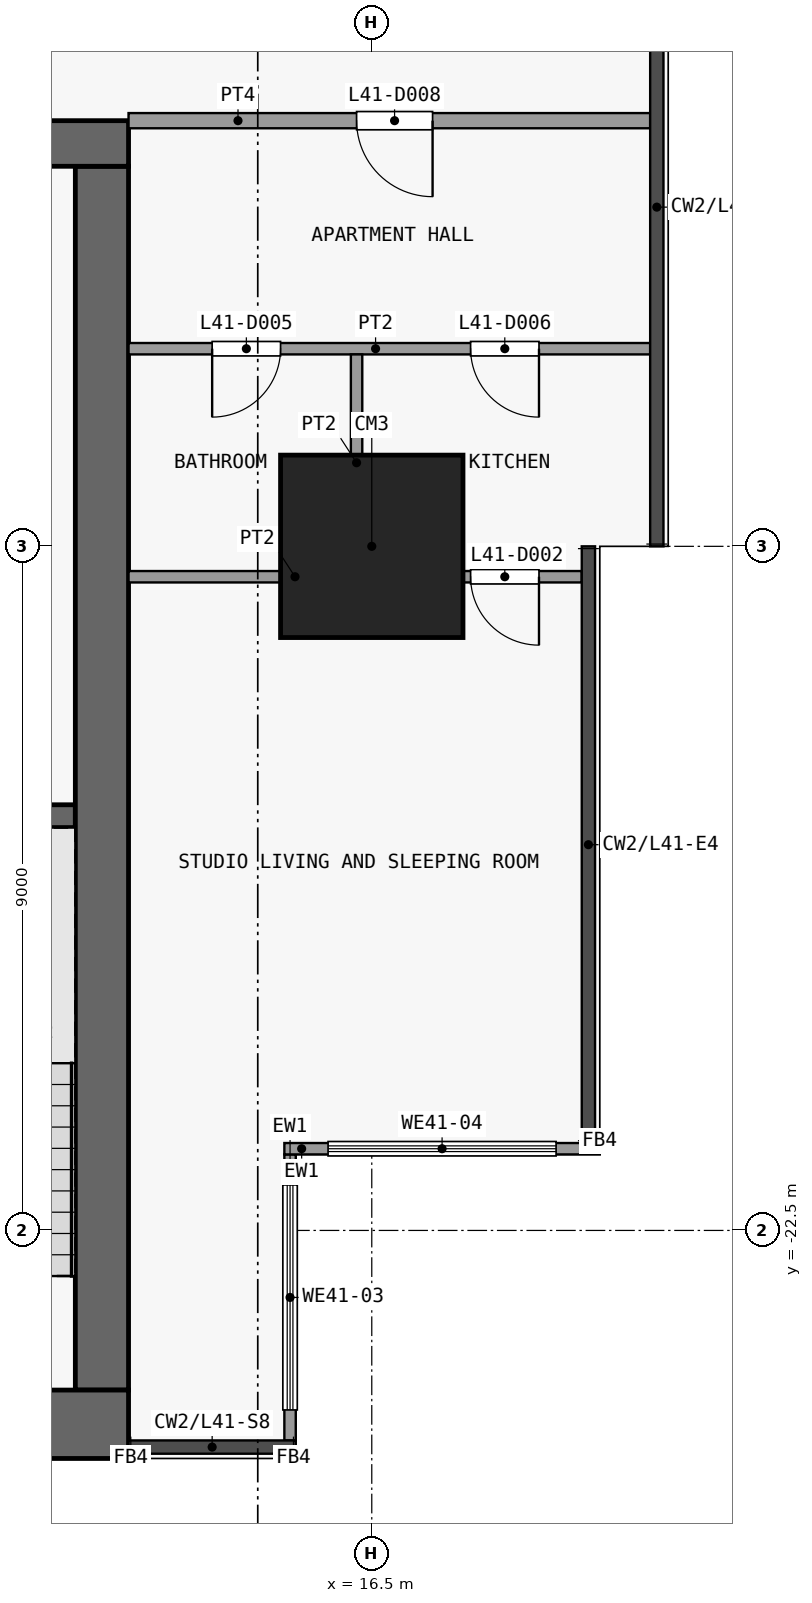
"""IFC4 building model, lengths in metres.
Left out: names, types, materials, properties, quantities, classifications, styles, units other than length and angle.
Written with IfcOpenShell. Run it as: python <this file> out.ifc"""

import sys

from ifc_helpers import new_model, si_unit, direction, frame, frame_2d, origin, origin_2d, place, context, subcontext, project, spatial, rectangle, extrude, element, fill, save


model = new_model("IFC4")
c1 = context("Model", 3, precision=1e-05, world=origin(), true_north=direction((0.0, 1.0)))
c2 = subcontext(c1, "Body", "Model", "MODEL_VIEW")
j1 = project(units=[si_unit("LENGTHUNIT", "METRE"), si_unit("PLANEANGLEUNIT", "RADIAN")], contexts=[c1])
p1 = place(None, origin())
s1 = spatial("IfcSite", under=j1, at=p1, CompositionType="ELEMENT")
p2 = place(p1, origin())
s2 = spatial("IfcBuilding", under=s1, at=p2, CompositionType="ELEMENT")
p3 = place(p2, frame((0.0, 0.0, 167.3)))
s3 = spatial("IfcBuildingStorey", under=s2, at=p3, CompositionType="ELEMENT", Elevation=167.3)
p4 = place(p3, frame((16.5, -13.5, 0.0), z_axis=(0.0, 0.0, 1.0), x_axis=(1.0, 0.0, 0.0)))
e1 = element("IfcColumn", 1, at=p4, inside=s3, PredefinedType="COLUMN", context=c2, shape_type="SweptSolid", body=[
    extrude(rectangle(XDim=2.4, YDim=2.4, at=origin_2d()), origin(), (0.0, 0.0, 1.0), 3.6),
])
p5 = place(p3, frame((-13.3, -25.05, 0.0), z_axis=(0.0, 0.0, 1.0), x_axis=(1.0, 0.0, 0.0)))
e2 = element("IfcWall", 2, at=p5, inside=s3, PredefinedType="SHEAR", context=c2, shape_type="SweptSolid", body=[
    extrude(rectangle(XDim=26.6, YDim=0.9, at=frame_2d((13.3, 0.0))), origin(), (0.0, 0.0, 1.0), 3.3),
])
p6 = place(p3, frame((-13.3, -8.2, 0.0), z_axis=(0.0, 0.0, 1.0), x_axis=(1.0, 0.0, 0.0)))
e3 = element("IfcWall", 3, at=p6, inside=s3, PredefinedType="SHEAR", context=c2, shape_type="SweptSolid", body=[
    extrude(rectangle(XDim=26.6, YDim=0.6, at=frame_2d((13.3, 0.0))), origin(), (0.0, 0.0, 1.0), 3.3),
])
p7 = place(p6, frame((7.6, 0.0, 0.0)))
e4 = element("IfcOpeningElement", 4, at=p7, cuts=e3, PredefinedType="OPENING", context=c2, shape_type="SweptSolid", body=[
    extrude(rectangle(XDim=1.8, YDim=2.1, at=frame_2d((0.9, 1.05))), frame((0.0, 0.31, 0.0), z_axis=(0.0, -1.0, 0.0), x_axis=(1.0, 0.0, 0.0)), (0.0, 0.0, 1.0), 0.62),
])
p8 = place(p6, frame((17.2, 0.0, 0.0)))
e5 = element("IfcOpeningElement", 5, at=p8, cuts=e3, PredefinedType="OPENING", context=c2, shape_type="SweptSolid", body=[
    extrude(rectangle(XDim=1.8, YDim=2.1, at=frame_2d((0.9, 1.05))), frame((0.0, 0.31, 0.0), z_axis=(0.0, -1.0, 0.0), x_axis=(1.0, 0.0, 0.0)), (0.0, 0.0, 1.0), 0.62),
])
p9 = place(p6, frame((2.525, 0.0, 0.0)))
e6 = element("IfcOpeningElement", 6, at=p9, cuts=e3, PredefinedType="OPENING", context=c2, shape_type="SweptSolid", body=[
    extrude(rectangle(XDim=0.9, YDim=2.1, at=frame_2d((0.45, 1.05))), frame((0.0, 0.31, 0.0), z_axis=(0.0, -1.0, 0.0), x_axis=(1.0, 0.0, 0.0)), (0.0, 0.0, 1.0), 0.62),
])
p10 = place(p6, frame((23.875, 0.0, 0.0)))
e7 = element("IfcOpeningElement", 7, at=p10, cuts=e3, PredefinedType="OPENING", context=c2, shape_type="SweptSolid", body=[
    extrude(rectangle(XDim=1.2, YDim=2.1, at=frame_2d((0.6, 1.05))), frame((0.0, 0.31, 0.0), z_axis=(0.0, -1.0, 0.0), x_axis=(1.0, 0.0, 0.0)), (0.0, 0.0, 1.0), 0.62),
])
p11 = place(p3, frame((12.95, -24.6, 0.0), z_axis=(0.0, 0.0, 1.0), x_axis=(0.0, 1.0, 0.0)))
e8 = element("IfcWall", 8, at=p11, inside=s3, PredefinedType="SHEAR", context=c2, shape_type="SweptSolid", body=[
    extrude(rectangle(XDim=16.1, YDim=0.7, at=frame_2d((8.05, 0.0))), origin(), (0.0, 0.0, 1.0), 3.3),
])
p12 = place(p3, frame((9.5, -17.05, 0.0), z_axis=(0.0, 0.0, 1.0), x_axis=(1.0, 0.0, 0.0)))
e9 = element("IfcWall", 9, at=p12, inside=s3, PredefinedType="SHEAR", context=c2, shape_type="SweptSolid", body=[
    extrude(rectangle(XDim=3.1, YDim=0.3, at=frame_2d((1.55, 0.0))), origin(), (0.0, 0.0, 1.0), 3.3),
])
p13 = place(p3, frame((15.425, -21.5, 0.0), z_axis=(0.0, 0.0, 1.0), x_axis=(0.0, -1.0, 0.0)))
e10 = element("IfcWall", 10, at=p13, inside=s3, PredefinedType="SOLIDWALL", context=c2, shape_type="SweptSolid", body=[
    extrude(rectangle(XDim=3.762, YDim=0.15, at=frame_2d((1.881, 0.0))), origin(), (0.0, 0.0, 1.0), 3.3),
])
p14 = place(p13, frame((0.401, 0.0, 0.9)))
e11 = element("IfcOpeningElement", 11, at=p14, cuts=e10, PredefinedType="OPENING", context=c2, shape_type="SweptSolid", body=[
    extrude(rectangle(XDim=2.96, YDim=2.4, at=frame_2d((1.48, 1.2))), frame((0.0, 0.085, 0.0), z_axis=(0.0, -1.0, 0.0), x_axis=(1.0, 0.0, 0.0)), (0.0, 0.0, 1.0), 0.17),
])
p15 = place(p3, frame((19.5, -21.425, 0.0), z_axis=(0.0, 0.0, 1.0), x_axis=(-1.0, 0.0, 0.0)))
e12 = element("IfcWall", 12, at=p15, inside=s3, PredefinedType="SOLIDWALL", context=c2, shape_type="SweptSolid", body=[
    extrude(rectangle(XDim=4.15, YDim=0.15, at=frame_2d((2.075, 0.0))), origin(), (0.0, 0.0, 1.0), 3.3),
])
p16 = place(p15, frame((0.575, 0.0, 0.9)))
e13 = element("IfcOpeningElement", 13, at=p16, cuts=e12, PredefinedType="OPENING", context=c2, shape_type="SweptSolid", body=[
    extrude(rectangle(XDim=3.0, YDim=2.4, at=frame_2d((1.5, 1.2))), frame((0.0, 0.085, 0.0), z_axis=(0.0, -1.0, 0.0), x_axis=(1.0, 0.0, 0.0)), (0.0, 0.0, 1.0), 0.17),
])
p17 = place(p3, frame((13.3, -13.9, 0.0), z_axis=(0.0, 0.0, 1.0), x_axis=(1.0, 0.0, 0.0)))
e14 = element("IfcWall", 14, at=p17, inside=s3, PredefinedType="PARTITIONING", context=c2, shape_type="SweptSolid", body=[
    extrude(rectangle(XDim=5.962, YDim=0.15, at=frame_2d((2.981, 0.0))), origin(), (0.0, 0.0, 1.0), 3.3),
])
p18 = place(p17, frame((4.5, 0.0, 0.0)))
e15 = element("IfcOpeningElement", 15, at=p18, cuts=e14, PredefinedType="OPENING", context=c2, shape_type="SweptSolid", body=[
    extrude(rectangle(XDim=0.9, YDim=2.1, at=frame_2d((0.45, 1.05))), frame((0.0, 0.085, 0.0), z_axis=(0.0, -1.0, 0.0), x_axis=(1.0, 0.0, 0.0)), (0.0, 0.0, 1.0), 0.17),
])
p19 = place(p3, frame((13.3, -10.9, 0.0), z_axis=(0.0, 0.0, 1.0), x_axis=(1.0, 0.0, 0.0)))
e16 = element("IfcWall", 16, at=p19, inside=s3, PredefinedType="PARTITIONING", context=c2, shape_type="SweptSolid", body=[
    extrude(rectangle(XDim=6.863, YDim=0.15, at=frame_2d((3.431, 0.0))), origin(), (0.0, 0.0, 1.0), 3.3),
])
p20 = place(p19, frame((1.1, 0.0, 0.0)))
e17 = element("IfcOpeningElement", 17, at=p20, cuts=e16, PredefinedType="OPENING", context=c2, shape_type="SweptSolid", body=[
    extrude(rectangle(XDim=0.9, YDim=2.1, at=frame_2d((0.45, 1.05))), frame((0.0, 0.085, 0.0), z_axis=(0.0, -1.0, 0.0), x_axis=(1.0, 0.0, 0.0)), (0.0, 0.0, 1.0), 0.17),
])
p21 = place(p19, frame((4.5, 0.0, 0.0)))
e18 = element("IfcOpeningElement", 18, at=p21, cuts=e16, PredefinedType="OPENING", context=c2, shape_type="SweptSolid", body=[
    extrude(rectangle(XDim=0.9, YDim=2.1, at=frame_2d((0.45, 1.05))), frame((0.0, 0.085, 0.0), z_axis=(0.0, -1.0, 0.0), x_axis=(1.0, 0.0, 0.0)), (0.0, 0.0, 1.0), 0.17),
])
p22 = place(p3, frame((13.3, -7.9, 0.0), z_axis=(0.0, 0.0, 1.0), x_axis=(1.0, 0.0, 0.0)))
e19 = element("IfcWall", 19, at=p22, inside=s3, PredefinedType="PARTITIONING", context=c2, shape_type="SweptSolid", body=[
    extrude(rectangle(XDim=6.863, YDim=0.2, at=frame_2d((3.431, 0.0))), origin(), (0.0, 0.0, 1.0), 3.3),
])
p23 = place(p22, frame((3.0, 0.0, 0.0)))
e20 = element("IfcOpeningElement", 20, at=p23, cuts=e19, PredefinedType="OPENING", context=c2, shape_type="SweptSolid", body=[
    extrude(rectangle(XDim=1.0, YDim=2.1, at=frame_2d((0.5, 1.05))), frame((0.0, 0.11, 0.0), z_axis=(0.0, -1.0, 0.0), x_axis=(1.0, 0.0, 0.0)), (0.0, 0.0, 1.0), 0.22),
])
p24 = place(p3, frame((16.3, -13.825, 0.0), z_axis=(0.0, 0.0, 1.0), x_axis=(0.0, 1.0, 0.0)))
e21 = element("IfcWall", 21, at=p24, inside=s3, PredefinedType="PARTITIONING", context=c2, shape_type="SweptSolid", body=[
    extrude(rectangle(XDim=2.85, YDim=0.15, at=frame_2d((1.425, 0.0))), origin(), (0.0, 0.0, 1.0), 3.3),
])
p25 = place(p14, origin())
e22 = element("IfcWindow", 22, at=p25, inside=s3, PartitioningType="SINGLE_PANEL", PredefinedType="WINDOW", context=c2, shape_type="SweptSolid", body=[
    extrude(rectangle(XDim=2.96, YDim=2.4, at=frame_2d((1.48, 1.2))), frame((0.0, 0.03, 0.0), z_axis=(0.0, -1.0, 0.0), x_axis=(1.0, 0.0, 0.0)), (0.0, 0.0, 1.0), 0.06),
])
fill(e11, e22)
p26 = place(p16, origin())
e23 = element("IfcWindow", 23, at=p26, inside=s3, PartitioningType="SINGLE_PANEL", PredefinedType="WINDOW", context=c2, shape_type="SweptSolid", body=[
    extrude(rectangle(XDim=3.0, YDim=2.4, at=frame_2d((1.5, 1.2))), frame((0.0, 0.03, 0.0), z_axis=(0.0, -1.0, 0.0), x_axis=(1.0, 0.0, 0.0)), (0.0, 0.0, 1.0), 0.06),
])
fill(e13, e23)
p27 = place(p18, origin())
e24 = element("IfcDoor", 24, at=p27, inside=s3, OperationType="SINGLE_SWING_RIGHT", PredefinedType="DOOR", context=c2, shape_type="SweptSolid", body=[
    extrude(rectangle(XDim=0.9, YDim=2.1, at=frame_2d((0.45, 1.05))), frame((0.0, 0.025, 0.0), z_axis=(0.0, -1.0, 0.0), x_axis=(1.0, 0.0, 0.0)), (0.0, 0.0, 1.0), 0.05),
])
fill(e15, e24)
p28 = place(p20, origin())
e25 = element("IfcDoor", 25, at=p28, inside=s3, OperationType="SINGLE_SWING_LEFT", PredefinedType="DOOR", context=c2, shape_type="SweptSolid", body=[
    extrude(rectangle(XDim=0.9, YDim=2.1, at=frame_2d((0.45, 1.05))), frame((0.0, 0.025, 0.0), z_axis=(0.0, -1.0, 0.0), x_axis=(1.0, 0.0, 0.0)), (0.0, 0.0, 1.0), 0.05),
])
fill(e17, e25)
p29 = place(p21, origin())
e26 = element("IfcDoor", 26, at=p29, inside=s3, OperationType="SINGLE_SWING_RIGHT", PredefinedType="DOOR", context=c2, shape_type="SweptSolid", body=[
    extrude(rectangle(XDim=0.9, YDim=2.1, at=frame_2d((0.45, 1.05))), frame((0.0, 0.025, 0.0), z_axis=(0.0, -1.0, 0.0), x_axis=(1.0, 0.0, 0.0)), (0.0, 0.0, 1.0), 0.05),
])
fill(e18, e26)
p30 = place(p23, origin())
e27 = element("IfcDoor", 27, at=p30, inside=s3, OperationType="SINGLE_SWING_RIGHT", PredefinedType="DOOR", context=c2, shape_type="SweptSolid", body=[
    extrude(rectangle(XDim=1.0, YDim=2.1, at=frame_2d((0.5, 1.05))), frame((0.0, 0.025, 0.0), z_axis=(0.0, -1.0, 0.0), x_axis=(1.0, 0.0, 0.0)), (0.0, 0.0, 1.0), 0.05),
])
fill(e20, e27)
save(model, sys.argv[1])
